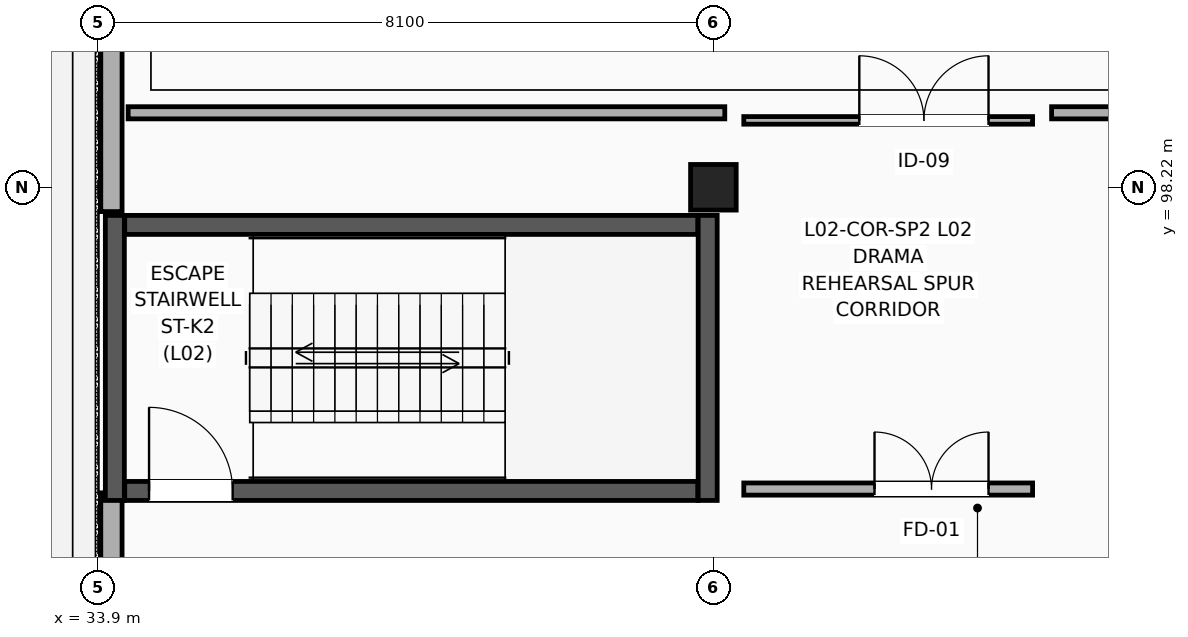
"""IFC4 building model, lengths in metres.
Left out: names, types, materials, properties, quantities, classifications, styles, units other than length and angle.
Written with IfcOpenShell. Run it as: python <this file> out.ifc"""

import sys

from ifc_helpers import new_model, si_unit, direction, frame, frame_2d, origin, origin_2d, place, context, subcontext, project, spatial, rectangle, extrude, element, fill, save


model = new_model("IFC4")
c1 = context("Model", 3, precision=1e-05, world=origin(), true_north=direction((0.0, 1.0)))
c2 = subcontext(c1, "Body", "Model", "MODEL_VIEW")
j1 = project(units=[si_unit("LENGTHUNIT", "METRE"), si_unit("PLANEANGLEUNIT", "RADIAN")], contexts=[c1])
p1 = place(None, origin())
s1 = spatial("IfcSite", under=j1, at=p1, CompositionType="ELEMENT")
p2 = place(p1, origin())
s2 = spatial("IfcBuilding", under=s1, at=p2, CompositionType="ELEMENT")
p3 = place(p2, frame((0.0, 0.0, 10.2)))
s3 = spatial("IfcBuildingStorey", under=s2, at=p3, CompositionType="ELEMENT", Elevation=10.2)
p4 = place(p3, frame((42.0, 98.22, 0.0), z_axis=(0.0, 0.0, 1.0), x_axis=(1.0, 0.0, 0.0)))
e1 = element("IfcColumn", 1, at=p4, inside=s3, PredefinedType="COLUMN", context=c2, shape_type="SweptSolid", body=[
    extrude(rectangle(XDim=0.6, YDim=0.6, at=origin_2d()), origin(), (0.0, 0.0, 1.0), 4.5),
])
p5 = place(p3, frame((34.08, 83.6, 0.0), z_axis=(0.0, 0.0, 1.0), x_axis=(0.0, 1.0, 0.0)))
e2 = element("IfcWall", 2, at=p5, inside=s3, PredefinedType="SOLIDWALL", context=c2, shape_type="SweptSolid", body=[
    extrude(rectangle(XDim=10.6, YDim=0.28, at=frame_2d((5.3, 0.0))), origin(), (0.0, 0.0, 1.0), 4.205),
])
p6 = place(p3, frame((34.08, 97.9, 0.0), z_axis=(0.0, 0.0, 1.0), x_axis=(0.0, 1.0, 0.0)))
e3 = element("IfcWall", 3, at=p6, inside=s3, PredefinedType="SOLIDWALL", context=c2, shape_type="SweptSolid", body=[
    extrude(rectangle(XDim=15.05, YDim=0.28, at=frame_2d((7.525, 0.0))), origin(), (0.0, 0.0, 1.0), 4.205),
])
p7 = place(p3, frame((34.255, 94.225, 0.0), z_axis=(0.0, 0.0, 1.0), x_axis=(1.0, 0.0, 0.0)))
e4 = element("IfcWall", 4, at=p7, inside=s3, PredefinedType="SHEAR", context=c2, shape_type="SweptSolid", body=[
    extrude(rectangle(XDim=7.54, YDim=0.25, at=frame_2d((3.77, 0.0))), origin(), (0.0, 0.0, 1.0), 4.225),
])
p8 = place(p7, frame((0.32, 0.0, 0.0)))
e5 = element("IfcOpeningElement", 5, at=p8, cuts=e4, PredefinedType="OPENING", context=c2, shape_type="SweptSolid", body=[
    extrude(rectangle(XDim=1.1, YDim=2.2, at=frame_2d((0.55, 1.1))), frame((0.0, 0.135, 0.0), z_axis=(0.0, -1.0, 0.0), x_axis=(1.0, 0.0, 0.0)), (0.0, 0.0, 1.0), 0.27),
])
p9 = place(p3, frame((34.255, 97.725, 0.0), z_axis=(0.0, 0.0, 1.0), x_axis=(1.0, 0.0, 0.0)))
e6 = element("IfcWall", 6, at=p9, inside=s3, PredefinedType="SHEAR", context=c2, shape_type="SweptSolid", body=[
    extrude(rectangle(XDim=7.54, YDim=0.25, at=frame_2d((3.77, 0.0))), origin(), (0.0, 0.0, 1.0), 4.225),
])
for number, where, z_axis, x_axis in (
    (7, (34.125, 94.1, 0.0), (0.0, 0.0, 1.0), (0.0, 1.0, 0.0)),
    (8, (41.925, 94.1, 0.0), (0.0, 0.0, 1.0), (0.0, 1.0, 0.0)),
):
    element("IfcWall", number, at=place(p3, frame(where, z_axis=z_axis, x_axis=x_axis)), inside=s3, PredefinedType="SHEAR", context=c2, shape_type="SweptSolid", body=[
        extrude(rectangle(XDim=3.75, YDim=0.25, at=frame_2d((1.875, 0.0))), origin(), (0.0, 0.0, 1.0), 4.225),
    ])
p10 = place(p3, frame((42.4, 94.25, 0.0), z_axis=(0.0, 0.0, 1.0), x_axis=(1.0, 0.0, 0.0)))
e9 = element("IfcWall", 9, at=p10, inside=s3, PredefinedType="PARTITIONING", context=c2, shape_type="SweptSolid", body=[
    extrude(rectangle(XDim=3.8, YDim=0.16, at=frame_2d((1.9, 0.0))), origin(), (0.0, 0.0, 1.0), 3.807),
])
p11 = place(p10, frame((1.72, 0.0, 0.0)))
e10 = element("IfcOpeningElement", 10, at=p11, cuts=e9, PredefinedType="OPENING", context=c2, shape_type="SweptSolid", body=[
    extrude(rectangle(XDim=1.5, YDim=2.2, at=frame_2d((0.75, 1.1))), frame((0.0, 0.09, 0.0), z_axis=(0.0, -1.0, 0.0), x_axis=(1.0, 0.0, 0.0)), (0.0, 0.0, 1.0), 0.18),
])
p12 = place(p3, frame((42.4, 99.1, 0.0), z_axis=(0.0, 0.0, 1.0), x_axis=(1.0, 0.0, 0.0)))
e11 = element("IfcWall", 11, at=p12, inside=s3, PredefinedType="PARTITIONING", context=c2, shape_type="SweptSolid", body=[
    extrude(rectangle(XDim=3.8, YDim=0.1, at=frame_2d((1.9, 0.0))), origin(), (0.0, 0.0, 1.0), 3.757),
])
p13 = place(p12, frame((1.52, 0.0, 0.0)))
e12 = element("IfcOpeningElement", 12, at=p13, cuts=e11, PredefinedType="OPENING", context=c2, shape_type="SweptSolid", body=[
    extrude(rectangle(XDim=1.7, YDim=2.35, at=frame_2d((0.85, 1.175))), frame((0.0, 0.06, 0.0), z_axis=(0.0, -1.0, 0.0), x_axis=(1.0, 0.0, 0.0)), (0.0, 0.0, 1.0), 0.12),
])
p14 = place(p3, frame((34.3, 99.2, 0.0), z_axis=(0.0, 0.0, 1.0), x_axis=(1.0, 0.0, 0.0)))
e13 = element("IfcWall", 13, at=p14, inside=s3, PredefinedType="PARTITIONING", context=c2, shape_type="SweptSolid", body=[
    extrude(rectangle(XDim=7.85, YDim=0.16, at=frame_2d((3.925, 0.0))), origin(), (0.0, 0.0, 1.0), 3.607),
])
p15 = place(p3, frame((46.45, 99.2, 0.0), z_axis=(0.0, 0.0, 1.0), x_axis=(1.0, 0.0, 0.0)))
e14 = element("IfcWall", 14, at=p15, inside=s3, PredefinedType="PARTITIONING", context=c2, shape_type="SweptSolid", body=[
    extrude(rectangle(XDim=19.35, YDim=0.16, at=frame_2d((9.675, 0.0))), origin(), (0.0, 0.0, 1.0), 3.877),
])
p16 = place(p8, origin())
e15 = element("IfcDoor", 15, at=p16, inside=s3, OperationType="SINGLE_SWING_LEFT", PredefinedType="DOOR", context=c2, shape_type="SweptSolid", body=[
    extrude(rectangle(XDim=1.1, YDim=2.2, at=frame_2d((0.55, 1.1))), frame((0.0, 0.025, 0.0), z_axis=(0.0, -1.0, 0.0), x_axis=(1.0, 0.0, 0.0)), (0.0, 0.0, 1.0), 0.05),
])
fill(e5, e15)
p17 = place(p11, origin())
e16 = element("IfcDoor", 16, at=p17, inside=s3, OperationType="DOUBLE_DOOR_SINGLE_SWING", PredefinedType="DOOR", context=c2, shape_type="SweptSolid", body=[
    extrude(rectangle(XDim=1.5, YDim=2.2, at=frame_2d((0.75, 1.1))), frame((0.0, 0.025, 0.0), z_axis=(0.0, -1.0, 0.0), x_axis=(1.0, 0.0, 0.0)), (0.0, 0.0, 1.0), 0.05),
])
fill(e10, e16)
p18 = place(p13, origin())
e17 = element("IfcDoor", 17, at=p18, inside=s3, OperationType="DOUBLE_DOOR_SINGLE_SWING", PredefinedType="DOOR", context=c2, shape_type="SweptSolid", body=[
    extrude(rectangle(XDim=1.7, YDim=2.35, at=frame_2d((0.85, 1.175))), frame((0.0, 0.025, 0.0), z_axis=(0.0, -1.0, 0.0), x_axis=(1.0, 0.0, 0.0)), (0.0, 0.0, 1.0), 0.05),
])
fill(e12, e17)
save(model, sys.argv[1])
